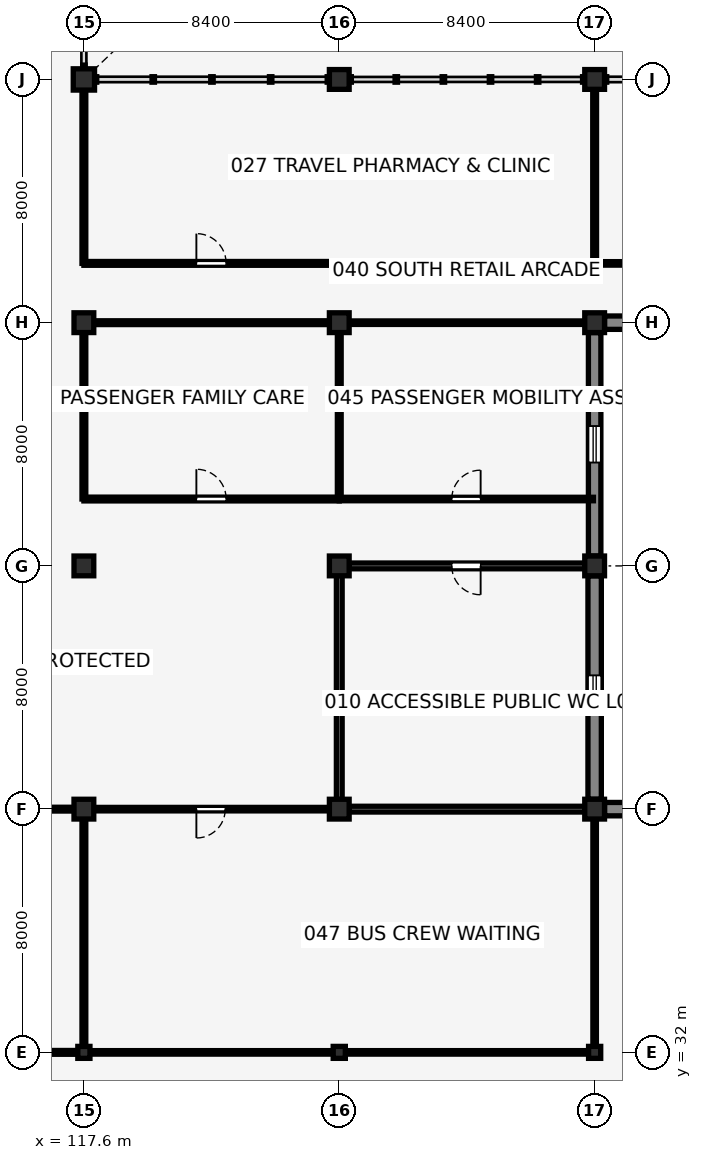
"""IFC4 building model, lengths in metres.
Left out: names, types, materials, properties, quantities, classifications, styles, units other than length and angle.
Written with IfcOpenShell. Run it as: python <this file> out.ifc"""

import sys

from ifc_helpers import new_model, si_unit, direction, frame, frame_2d, origin, origin_2d, place, context, subcontext, project, spatial, rectangle, circle, i_section, extrude, element, fill, save


model = new_model("IFC4")
c1 = context("Model", 3, precision=1e-05, world=origin(), true_north=direction((0.0, 1.0)))
c2 = subcontext(c1, "Body", "Model", "MODEL_VIEW")
j1 = project(units=[si_unit("LENGTHUNIT", "METRE"), si_unit("PLANEANGLEUNIT", "RADIAN")], contexts=[c1])
p1 = place(None, origin())
s1 = spatial("IfcSite", under=j1, at=p1, CompositionType="ELEMENT")
p2 = place(p1, origin())
s2 = spatial("IfcBuilding", under=s1, at=p2, CompositionType="ELEMENT")
p3 = place(p2, origin())
s3 = spatial("IfcBuildingStorey", under=s2, at=p3, CompositionType="ELEMENT", Elevation=0.0)
p4 = place(p3, frame((117.6, 32.0, 0.0), z_axis=(0.0, 0.0, 1.0), x_axis=(1.0, 0.0, 0.0)))
e1 = element("IfcColumn", 1, at=p4, inside=s3, PredefinedType="COLUMN", context=c2, shape_type="SweptSolid", body=[
    extrude(i_section(OverallWidth=0.399, OverallDepth=0.394, WebThickness=0.023, FlangeThickness=0.037, FilletRadius=0.015, at=origin_2d()), origin(), (0.0, 0.0, 1.0), 5.15),
])
for number, where, z_axis, x_axis in (
    (2, (117.6, 40.0, 0.0), (0.0, 0.0, 1.0), (1.0, 0.0, 0.0)),
    (3, (117.6, 48.0, 0.0), (0.0, 0.0, 1.0), (1.0, 0.0, 0.0)),
    (4, (117.6, 56.0, 0.0), (0.0, 0.0, 1.0), (1.0, 0.0, 0.0)),
):
    element("IfcColumn", number, at=place(p3, frame(where, z_axis=z_axis, x_axis=x_axis)), inside=s3, PredefinedType="COLUMN", context=c2, shape_type="SweptSolid", body=[
        extrude(circle(Radius=0.325, at=origin_2d()), origin(), (0.0, 0.0, 1.0), 5.15),
    ])
p5 = place(p3, frame((117.6, 64.0, 0.0), z_axis=(0.0, 0.0, 1.0), x_axis=(1.0, 0.0, 0.0)))
e5 = element("IfcColumn", 5, at=p5, inside=s3, PredefinedType="COLUMN", context=c2, shape_type="SweptSolid", body=[
    extrude(rectangle(XDim=0.7, YDim=0.7, at=origin_2d()), origin(), (0.0, 0.0, 1.0), 5.15),
])
p6 = place(p3, frame((126.0, 32.0, 0.0), z_axis=(0.0, 0.0, 1.0), x_axis=(1.0, 0.0, 0.0)))
e6 = element("IfcColumn", 6, at=p6, inside=s3, PredefinedType="COLUMN", context=c2, shape_type="SweptSolid", body=[
    extrude(i_section(OverallWidth=0.399, OverallDepth=0.394, WebThickness=0.023, FlangeThickness=0.037, FilletRadius=0.015, at=origin_2d()), origin(), (0.0, 0.0, 1.0), 5.15),
])
for number, where, z_axis, x_axis in (
    (7, (126.0, 40.0, 0.0), (0.0, 0.0, 1.0), (1.0, 0.0, 0.0)),
    (8, (126.0, 48.0, 0.0), (0.0, 0.0, 1.0), (1.0, 0.0, 0.0)),
    (9, (126.0, 56.0, 0.0), (0.0, 0.0, 1.0), (1.0, 0.0, 0.0)),
    (10, (126.0, 64.0, 0.0), (0.0, 0.0, 1.0), (1.0, 0.0, 0.0)),
):
    element("IfcColumn", number, at=place(p3, frame(where, z_axis=z_axis, x_axis=x_axis)), inside=s3, PredefinedType="COLUMN", context=c2, shape_type="SweptSolid", body=[
        extrude(circle(Radius=0.325, at=origin_2d()), origin(), (0.0, 0.0, 1.0), 5.15),
    ])
p7 = place(p3, frame((134.4, 32.0, 0.0), z_axis=(0.0, 0.0, 1.0), x_axis=(1.0, 0.0, 0.0)))
e11 = element("IfcColumn", 11, at=p7, inside=s3, PredefinedType="COLUMN", context=c2, shape_type="SweptSolid", body=[
    extrude(i_section(OverallWidth=0.399, OverallDepth=0.394, WebThickness=0.023, FlangeThickness=0.037, FilletRadius=0.015, at=origin_2d()), origin(), (0.0, 0.0, 1.0), 5.15),
])
for number, where, z_axis, x_axis in (
    (12, (134.4, 40.0, 0.0), (0.0, 0.0, 1.0), (1.0, 0.0, 0.0)),
    (13, (134.4, 48.0, 0.0), (0.0, 0.0, 1.0), (1.0, 0.0, 0.0)),
    (14, (134.4, 56.0, 0.0), (0.0, 0.0, 1.0), (1.0, 0.0, 0.0)),
    (15, (134.4, 64.0, 0.0), (0.0, 0.0, 1.0), (1.0, 0.0, 0.0)),
):
    element("IfcColumn", number, at=place(p3, frame(where, z_axis=z_axis, x_axis=x_axis)), inside=s3, PredefinedType="COLUMN", context=c2, shape_type="SweptSolid", body=[
        extrude(circle(Radius=0.325, at=origin_2d()), origin(), (0.0, 0.0, 1.0), 5.15),
    ])
p8 = place(p3, frame((134.725, 56.0, 0.0), z_axis=(0.0, 0.0, 1.0), x_axis=(1.0, 0.0, 0.0)))
e16 = element("IfcWall", 16, at=p8, inside=s3, PredefinedType="SOLIDWALL", context=c2, shape_type="SweptSolid", body=[
    extrude(rectangle(XDim=7.75, YDim=0.44, at=frame_2d((3.875, 0.0))), origin(), (0.0, 0.0, 1.0), 4.74),
])
p9 = place(p8, frame((2.825, 0.0, 1.55), z_axis=(0.0, 0.0, 1.0), x_axis=(1.0, 0.0, 0.0)))
e17 = element("IfcOpeningElement", 17, at=p9, cuts=e16, PredefinedType="OPENING", context=c2, shape_type="SweptSolid", body=[
    extrude(rectangle(XDim=2.1, YDim=0.8, at=frame_2d((1.05, 0.4))), frame((0.0, 0.23, 0.0), z_axis=(0.0, -1.0, 0.0), x_axis=(1.0, 0.0, 0.0)), (0.0, 0.0, 1.0), 0.46),
])
p10 = place(p3, frame((134.4, 40.325, 0.0), z_axis=(0.0, 0.0, 1.0), x_axis=(0.0, 1.0, 0.0)))
e18 = element("IfcWall", 18, at=p10, inside=s3, PredefinedType="SOLIDWALL", context=c2, shape_type="SweptSolid", body=[
    extrude(rectangle(XDim=7.35, YDim=0.44, at=frame_2d((3.675, 0.0))), origin(), (0.0, 0.0, 1.0), 4.747),
])
p11 = place(p10, frame((3.275, 0.0, 0.65), z_axis=(0.0, 0.0, 1.0), x_axis=(1.0, 0.0, 0.0)))
e19 = element("IfcOpeningElement", 19, at=p11, cuts=e18, PredefinedType="OPENING", context=c2, shape_type="SweptSolid", body=[
    extrude(rectangle(XDim=0.8, YDim=1.85, at=frame_2d((0.4, 0.925))), frame((0.0, 0.23, 0.0), z_axis=(0.0, -1.0, 0.0), x_axis=(1.0, 0.0, 0.0)), (0.0, 0.0, 1.0), 0.46),
])
p12 = place(p3, frame((134.4, 48.325, 0.0), z_axis=(0.0, 0.0, 1.0), x_axis=(0.0, 1.0, 0.0)))
e20 = element("IfcWall", 20, at=p12, inside=s3, PredefinedType="SOLIDWALL", context=c2, shape_type="SweptSolid", body=[
    extrude(rectangle(XDim=7.35, YDim=0.41, at=frame_2d((3.675, 0.0))), origin(), (0.0, 0.0, 1.0), 4.747),
])
p13 = place(p12, frame((3.075, 0.0, 1.55), z_axis=(0.0, 0.0, 1.0), x_axis=(1.0, 0.0, 0.0)))
e21 = element("IfcOpeningElement", 21, at=p13, cuts=e20, PredefinedType="OPENING", context=c2, shape_type="SweptSolid", body=[
    extrude(rectangle(XDim=1.2, YDim=0.95, at=frame_2d((0.6, 0.475))), frame((0.0, 0.215, 0.0), z_axis=(0.0, -1.0, 0.0), x_axis=(1.0, 0.0, 0.0)), (0.0, 0.0, 1.0), 0.43),
])
p14 = place(p3, frame((134.725, 40.0, 0.0), z_axis=(0.0, 0.0, 1.0), x_axis=(1.0, 0.0, 0.0)))
e22 = element("IfcWall", 22, at=p14, inside=s3, PredefinedType="SOLIDWALL", context=c2, shape_type="SweptSolid", body=[
    extrude(rectangle(XDim=7.75, YDim=0.44, at=frame_2d((3.875, 0.0))), origin(), (0.0, 0.0, 1.0), 4.74),
])
p15 = place(p14, frame((3.075, 0.0, 0.9), z_axis=(0.0, 0.0, 1.0), x_axis=(1.0, 0.0, 0.0)))
e23 = element("IfcOpeningElement", 23, at=p15, cuts=e22, PredefinedType="OPENING", context=c2, shape_type="SweptSolid", body=[
    extrude(rectangle(XDim=1.6, YDim=1.2, at=frame_2d((0.8, 0.6))), frame((0.0, 0.23, 0.0), z_axis=(0.0, -1.0, 0.0), x_axis=(1.0, 0.0, 0.0)), (0.0, 0.0, 1.0), 0.46),
])
p16 = place(p3, frame((126.315, 48.0, 0.0), z_axis=(0.0, 0.0, 1.0), x_axis=(1.0, 0.0, 0.0)))
e24 = element("IfcWall", 24, at=p16, inside=s3, PredefinedType="PLUMBINGWALL", context=c2, shape_type="SweptSolid", body=[
    extrude(rectangle(XDim=7.77, YDim=0.19, at=frame_2d((3.885, 0.0))), origin(), (0.0, 0.0, 1.0), 4.605),
])
p17 = place(p16, frame((4.335, 0.0, 0.0), z_axis=(0.0, 0.0, 1.0), x_axis=(-1.0, 0.0, 0.0)))
e25 = element("IfcOpeningElement", 25, at=p17, cuts=e24, PredefinedType="OPENING", context=c2, shape_type="SweptSolid", body=[
    extrude(rectangle(XDim=0.95, YDim=2.15, at=frame_2d((0.475, 1.075))), frame((0.0, 0.105, 0.0), z_axis=(0.0, -1.0, 0.0), x_axis=(1.0, 0.0, 0.0)), (0.0, 0.0, 1.0), 0.21),
])
p18 = place(p3, frame((117.6, 50.2, 0.0), z_axis=(0.0, 0.0, 1.0), x_axis=(1.0, 0.0, 0.0)))
e26 = element("IfcWall", 26, at=p18, inside=s3, PredefinedType="PARTITIONING", context=c2, shape_type="SweptSolid", body=[
    extrude(rectangle(XDim=8.4, YDim=0.125, at=frame_2d((4.2, 0.0))), origin(), (0.0, 0.0, 1.0), 5.15),
])
p19 = place(p18, frame((3.7, 0.0, 0.0), z_axis=(0.0, 0.0, 1.0), x_axis=(1.0, 0.0, 0.0)))
e27 = element("IfcOpeningElement", 27, at=p19, cuts=e26, PredefinedType="OPENING", context=c2, shape_type="SweptSolid", body=[
    extrude(rectangle(XDim=0.98, YDim=2.15, at=frame_2d((0.49, 1.075))), frame((0.0, 0.073, 0.0), z_axis=(0.0, -1.0, 0.0), x_axis=(1.0, 0.0, 0.0)), (0.0, 0.0, 1.0), 0.145),
])
p20 = place(p3, frame((126.0, 50.2, 0.0), z_axis=(0.0, 0.0, 1.0), x_axis=(1.0, 0.0, 0.0)))
e28 = element("IfcWall", 28, at=p20, inside=s3, PredefinedType="PARTITIONING", context=c2, shape_type="SweptSolid", body=[
    extrude(rectangle(XDim=8.36, YDim=0.115, at=frame_2d((4.18, 0.0))), origin(), (0.0, 0.0, 1.0), 5.15),
])
p21 = place(p20, frame((3.7, 0.0, 0.0), z_axis=(0.0, 0.0, 1.0), x_axis=(1.0, 0.0, 0.0)))
e29 = element("IfcOpeningElement", 29, at=p21, cuts=e28, PredefinedType="OPENING", context=c2, shape_type="SweptSolid", body=[
    extrude(rectangle(XDim=0.95, YDim=2.15, at=frame_2d((0.475, 1.075))), frame((0.0, 0.067, 0.0), z_axis=(0.0, -1.0, 0.0), x_axis=(1.0, 0.0, 0.0)), (0.0, 0.0, 1.0), 0.135),
])
p22 = place(p3, frame((117.915, 40.0, 0.0), z_axis=(0.0, 0.0, 1.0), x_axis=(1.0, 0.0, 0.0)))
e30 = element("IfcWall", 30, at=p22, inside=s3, PredefinedType="PARTITIONING", context=c2, shape_type="SweptSolid", body=[
    extrude(rectangle(XDim=7.77, YDim=0.115, at=frame_2d((3.885, 0.0))), origin(), (0.0, 0.0, 1.0), 4.605),
])
p23 = place(p22, frame((4.335, 0.0, 0.0), z_axis=(0.0, 0.0, 1.0), x_axis=(-1.0, 0.0, 0.0)))
e31 = element("IfcOpeningElement", 31, at=p23, cuts=e30, PredefinedType="OPENING", context=c2, shape_type="SweptSolid", body=[
    extrude(rectangle(XDim=0.95, YDim=2.15, at=frame_2d((0.475, 1.075))), frame((0.0, 0.067, 0.0), z_axis=(0.0, -1.0, 0.0), x_axis=(1.0, 0.0, 0.0)), (0.0, 0.0, 1.0), 0.135),
])
p24 = place(p3, frame((117.6, 57.95, 0.0), z_axis=(0.0, 0.0, 1.0), x_axis=(1.0, 0.0, 0.0)))
e32 = element("IfcWall", 32, at=p24, inside=s3, PredefinedType="PARTITIONING", context=c2, shape_type="SweptSolid", body=[
    extrude(rectangle(XDim=16.8, YDim=0.125, at=frame_2d((8.4, 0.0))), origin(), (0.0, 0.0, 1.0), 5.15),
])
p25 = place(p24, frame((3.7, 0.0, 0.0), z_axis=(0.0, 0.0, 1.0), x_axis=(1.0, 0.0, 0.0)))
e33 = element("IfcOpeningElement", 33, at=p25, cuts=e32, PredefinedType="OPENING", context=c2, shape_type="SweptSolid", body=[
    extrude(rectangle(XDim=0.98, YDim=2.15, at=frame_2d((0.49, 1.075))), frame((0.0, 0.073, 0.0), z_axis=(0.0, -1.0, 0.0), x_axis=(1.0, 0.0, 0.0)), (0.0, 0.0, 1.0), 0.145),
])
p26 = place(p3, frame((134.4, 57.95, 0.0), z_axis=(0.0, 0.0, 1.0), x_axis=(1.0, 0.0, 0.0)))
e34 = element("IfcWall", 34, at=p26, inside=s3, PredefinedType="PARTITIONING", context=c2, shape_type="SweptSolid", body=[
    extrude(rectangle(XDim=16.8, YDim=0.115, at=frame_2d((8.4, 0.0))), origin(), (0.0, 0.0, 1.0), 4.542),
])
p27 = place(p26, frame((3.7, 0.0, 0.0), z_axis=(0.0, 0.0, 1.0), x_axis=(1.0, 0.0, 0.0)))
e35 = element("IfcOpeningElement", 35, at=p27, cuts=e34, PredefinedType="OPENING", context=c2, shape_type="SweptSolid", body=[
    extrude(rectangle(XDim=0.95, YDim=2.15, at=frame_2d((0.475, 1.075))), frame((0.0, 0.067, 0.0), z_axis=(0.0, -1.0, 0.0), x_axis=(1.0, 0.0, 0.0)), (0.0, 0.0, 1.0), 0.135),
])
p28 = place(p3, frame((126.315, 40.0, 0.0), z_axis=(0.0, 0.0, 1.0), x_axis=(1.0, 0.0, 0.0)))
e36 = element("IfcWall", 36, at=p28, inside=s3, PredefinedType="PLUMBINGWALL", context=c2, shape_type="SweptSolid", body=[
    extrude(rectangle(XDim=7.77, YDim=0.19, at=frame_2d((3.885, 0.0))), origin(), (0.0, 0.0, 1.0), 4.605),
])
p29 = place(p3, frame((126.0, 40.315, 0.0), z_axis=(0.0, 0.0, 1.0), x_axis=(0.0, 1.0, 0.0)))
e37 = element("IfcWall", 37, at=p29, inside=s3, PredefinedType="PLUMBINGWALL", context=c2, shape_type="SweptSolid", body=[
    extrude(rectangle(XDim=7.37, YDim=0.19, at=frame_2d((3.685, 0.0))), origin(), (0.0, 0.0, 1.0), 4.542),
])
p30 = place(p3, frame((117.915, 56.0, 0.0), z_axis=(0.0, 0.0, 1.0), x_axis=(1.0, 0.0, 0.0)))
e38 = element("IfcWall", 38, at=p30, inside=s3, PredefinedType="PARTITIONING", context=c2, shape_type="SweptSolid", body=[
    extrude(rectangle(XDim=7.77, YDim=0.125, at=frame_2d((3.885, 0.0))), origin(), (0.0, 0.0, 1.0), 4.605),
])
for number, where, z_axis, x_axis in (
    (39, (117.6, 50.2, 0.0), (0.0, 0.0, 1.0), (0.0, 1.0, 0.0)),
    (40, (126.0, 50.2, 0.0), (0.0, 0.0, 1.0), (0.0, 1.0, 0.0)),
):
    element("IfcWall", number, at=place(p3, frame(where, z_axis=z_axis, x_axis=x_axis)), inside=s3, PredefinedType="PARTITIONING", context=c2, shape_type="SweptSolid", body=[
        extrude(rectangle(XDim=5.485, YDim=0.125, at=frame_2d((2.743, 0.0))), origin(), (0.0, 0.0, 1.0), 4.542),
    ])
p31 = place(p3, frame((126.315, 56.0, 0.0), z_axis=(0.0, 0.0, 1.0), x_axis=(1.0, 0.0, 0.0)))
e41 = element("IfcWall", 41, at=p31, inside=s3, PredefinedType="PARTITIONING", context=c2, shape_type="SweptSolid", body=[
    extrude(rectangle(XDim=7.77, YDim=0.115, at=frame_2d((3.885, 0.0))), origin(), (0.0, 0.0, 1.0), 4.605),
])
p32 = place(p3, frame((109.515, 40.0, 0.0), z_axis=(0.0, 0.0, 1.0), x_axis=(1.0, 0.0, 0.0)))
e42 = element("IfcWall", 42, at=p32, inside=s3, PredefinedType="PARTITIONING", context=c2, shape_type="SweptSolid", body=[
    extrude(rectangle(XDim=7.77, YDim=0.125, at=frame_2d((3.885, 0.0))), origin(), (0.0, 0.0, 1.0), 4.605),
])
p33 = place(p3, frame((109.389, 32.0, 0.0), z_axis=(0.0, 0.0, 1.0), x_axis=(1.0, 0.0, 0.0)))
e43 = element("IfcWall", 43, at=p33, inside=s3, PredefinedType="PARTITIONING", context=c2, shape_type="SweptSolid", body=[
    extrude(rectangle(XDim=8.021, YDim=0.125, at=frame_2d((4.01, 0.0))), origin(), (0.0, 0.0, 1.0), 4.533),
])
p34 = place(p3, frame((117.6, 32.187, 0.0), z_axis=(0.0, 0.0, 1.0), x_axis=(0.0, 1.0, 0.0)))
e44 = element("IfcWall", 44, at=p34, inside=s3, PredefinedType="PARTITIONING", context=c2, shape_type="SweptSolid", body=[
    extrude(rectangle(XDim=7.498, YDim=0.125, at=frame_2d((3.749, 0.0))), origin(), (0.0, 0.0, 1.0), 4.542),
])
for number, where, z_axis, x_axis in (
    (45, (117.79, 32.0, 0.0), (0.0, 0.0, 1.0), (1.0, 0.0, 0.0)),
    (46, (126.189, 32.0, 0.0), (0.0, 0.0, 1.0), (1.0, 0.0, 0.0)),
):
    element("IfcWall", number, at=place(p3, frame(where, z_axis=z_axis, x_axis=x_axis)), inside=s3, PredefinedType="PARTITIONING", context=c2, shape_type="SweptSolid", body=[
        extrude(rectangle(XDim=8.021, YDim=0.115, at=frame_2d((4.01, 0.0))), origin(), (0.0, 0.0, 1.0), 4.533),
    ])
p35 = place(p3, frame((134.4, 32.187, 0.0), z_axis=(0.0, 0.0, 1.0), x_axis=(0.0, 1.0, 0.0)))
e47 = element("IfcWall", 47, at=p35, inside=s3, PredefinedType="PARTITIONING", context=c2, shape_type="SweptSolid", body=[
    extrude(rectangle(XDim=7.498, YDim=0.115, at=frame_2d((3.749, 0.0))), origin(), (0.0, 0.0, 1.0), 4.542),
])
p36 = place(p3, frame((117.6, 57.95, 0.0), z_axis=(0.0, 0.0, 1.0), x_axis=(0.0, 1.0, 0.0)))
e48 = element("IfcWall", 48, at=p36, inside=s3, PredefinedType="PARTITIONING", context=c2, shape_type="SweptSolid", body=[
    extrude(rectangle(XDim=5.71, YDim=0.125, at=frame_2d((2.855, 0.0))), origin(), (0.0, 0.0, 1.0), 4.542),
])
p37 = place(p3, frame((134.4, 57.95, 0.0), z_axis=(0.0, 0.0, 1.0), x_axis=(0.0, 1.0, 0.0)))
e49 = element("IfcWall", 49, at=p37, inside=s3, PredefinedType="PARTITIONING", context=c2, shape_type="SweptSolid", body=[
    extrude(rectangle(XDim=5.735, YDim=0.125, at=frame_2d((2.868, 0.0))), origin(), (0.0, 0.0, 1.0), 4.542),
])
p38 = place(p11, origin())
e50 = element("IfcWindow", 50, at=p38, inside=s3, PartitioningType="SINGLE_PANEL", PredefinedType="WINDOW", context=c2, shape_type="SweptSolid", body=[
    extrude(rectangle(XDim=0.8, YDim=1.85, at=frame_2d((0.4, 0.925))), frame((0.0, 0.03, 0.0), z_axis=(0.0, -1.0, 0.0), x_axis=(1.0, 0.0, 0.0)), (0.0, 0.0, 1.0), 0.06),
])
fill(e19, e50)
p39 = place(p13, origin())
e51 = element("IfcWindow", 51, at=p39, inside=s3, PartitioningType="SINGLE_PANEL", PredefinedType="WINDOW", context=c2, shape_type="SweptSolid", body=[
    extrude(rectangle(XDim=1.2, YDim=0.95, at=frame_2d((0.6, 0.475))), frame((0.0, 0.03, 0.0), z_axis=(0.0, -1.0, 0.0), x_axis=(1.0, 0.0, 0.0)), (0.0, 0.0, 1.0), 0.06),
])
fill(e21, e51)
p40 = place(p17, origin())
e52 = element("IfcDoor", 52, at=p40, inside=s3, OperationType="SINGLE_SWING_LEFT", PredefinedType="DOOR", context=c2, shape_type="SweptSolid", body=[
    extrude(rectangle(XDim=0.95, YDim=2.15, at=frame_2d((0.475, 1.075))), frame((0.0, 0.025, 0.0), z_axis=(0.0, -1.0, 0.0), x_axis=(1.0, 0.0, 0.0)), (0.0, 0.0, 1.0), 0.05),
])
fill(e25, e52)
p41 = place(p19, origin())
e53 = element("IfcDoor", 53, at=p41, inside=s3, OperationType="SINGLE_SWING_LEFT", PredefinedType="DOOR", context=c2, shape_type="SweptSolid", body=[
    extrude(rectangle(XDim=0.98, YDim=2.15, at=frame_2d((0.49, 1.075))), frame((0.0, 0.025, 0.0), z_axis=(0.0, -1.0, 0.0), x_axis=(1.0, 0.0, 0.0)), (0.0, 0.0, 1.0), 0.05),
])
fill(e27, e53)
p42 = place(p21, origin())
e54 = element("IfcDoor", 54, at=p42, inside=s3, OperationType="SINGLE_SWING_RIGHT", PredefinedType="DOOR", context=c2, shape_type="SweptSolid", body=[
    extrude(rectangle(XDim=0.95, YDim=2.15, at=frame_2d((0.475, 1.075))), frame((0.0, 0.025, 0.0), z_axis=(0.0, -1.0, 0.0), x_axis=(1.0, 0.0, 0.0)), (0.0, 0.0, 1.0), 0.05),
])
fill(e29, e54)
p43 = place(p23, origin())
e55 = element("IfcDoor", 55, at=p43, inside=s3, OperationType="SINGLE_SWING_RIGHT", PredefinedType="DOOR", context=c2, shape_type="SweptSolid", body=[
    extrude(rectangle(XDim=0.95, YDim=2.15, at=frame_2d((0.475, 1.075))), frame((0.0, 0.025, 0.0), z_axis=(0.0, -1.0, 0.0), x_axis=(1.0, 0.0, 0.0)), (0.0, 0.0, 1.0), 0.05),
])
fill(e31, e55)
p44 = place(p25, origin())
e56 = element("IfcDoor", 56, at=p44, inside=s3, OperationType="SINGLE_SWING_LEFT", PredefinedType="DOOR", context=c2, shape_type="SweptSolid", body=[
    extrude(rectangle(XDim=0.98, YDim=2.15, at=frame_2d((0.49, 1.075))), frame((0.0, 0.025, 0.0), z_axis=(0.0, -1.0, 0.0), x_axis=(1.0, 0.0, 0.0)), (0.0, 0.0, 1.0), 0.05),
])
fill(e33, e56)
save(model, sys.argv[1])
